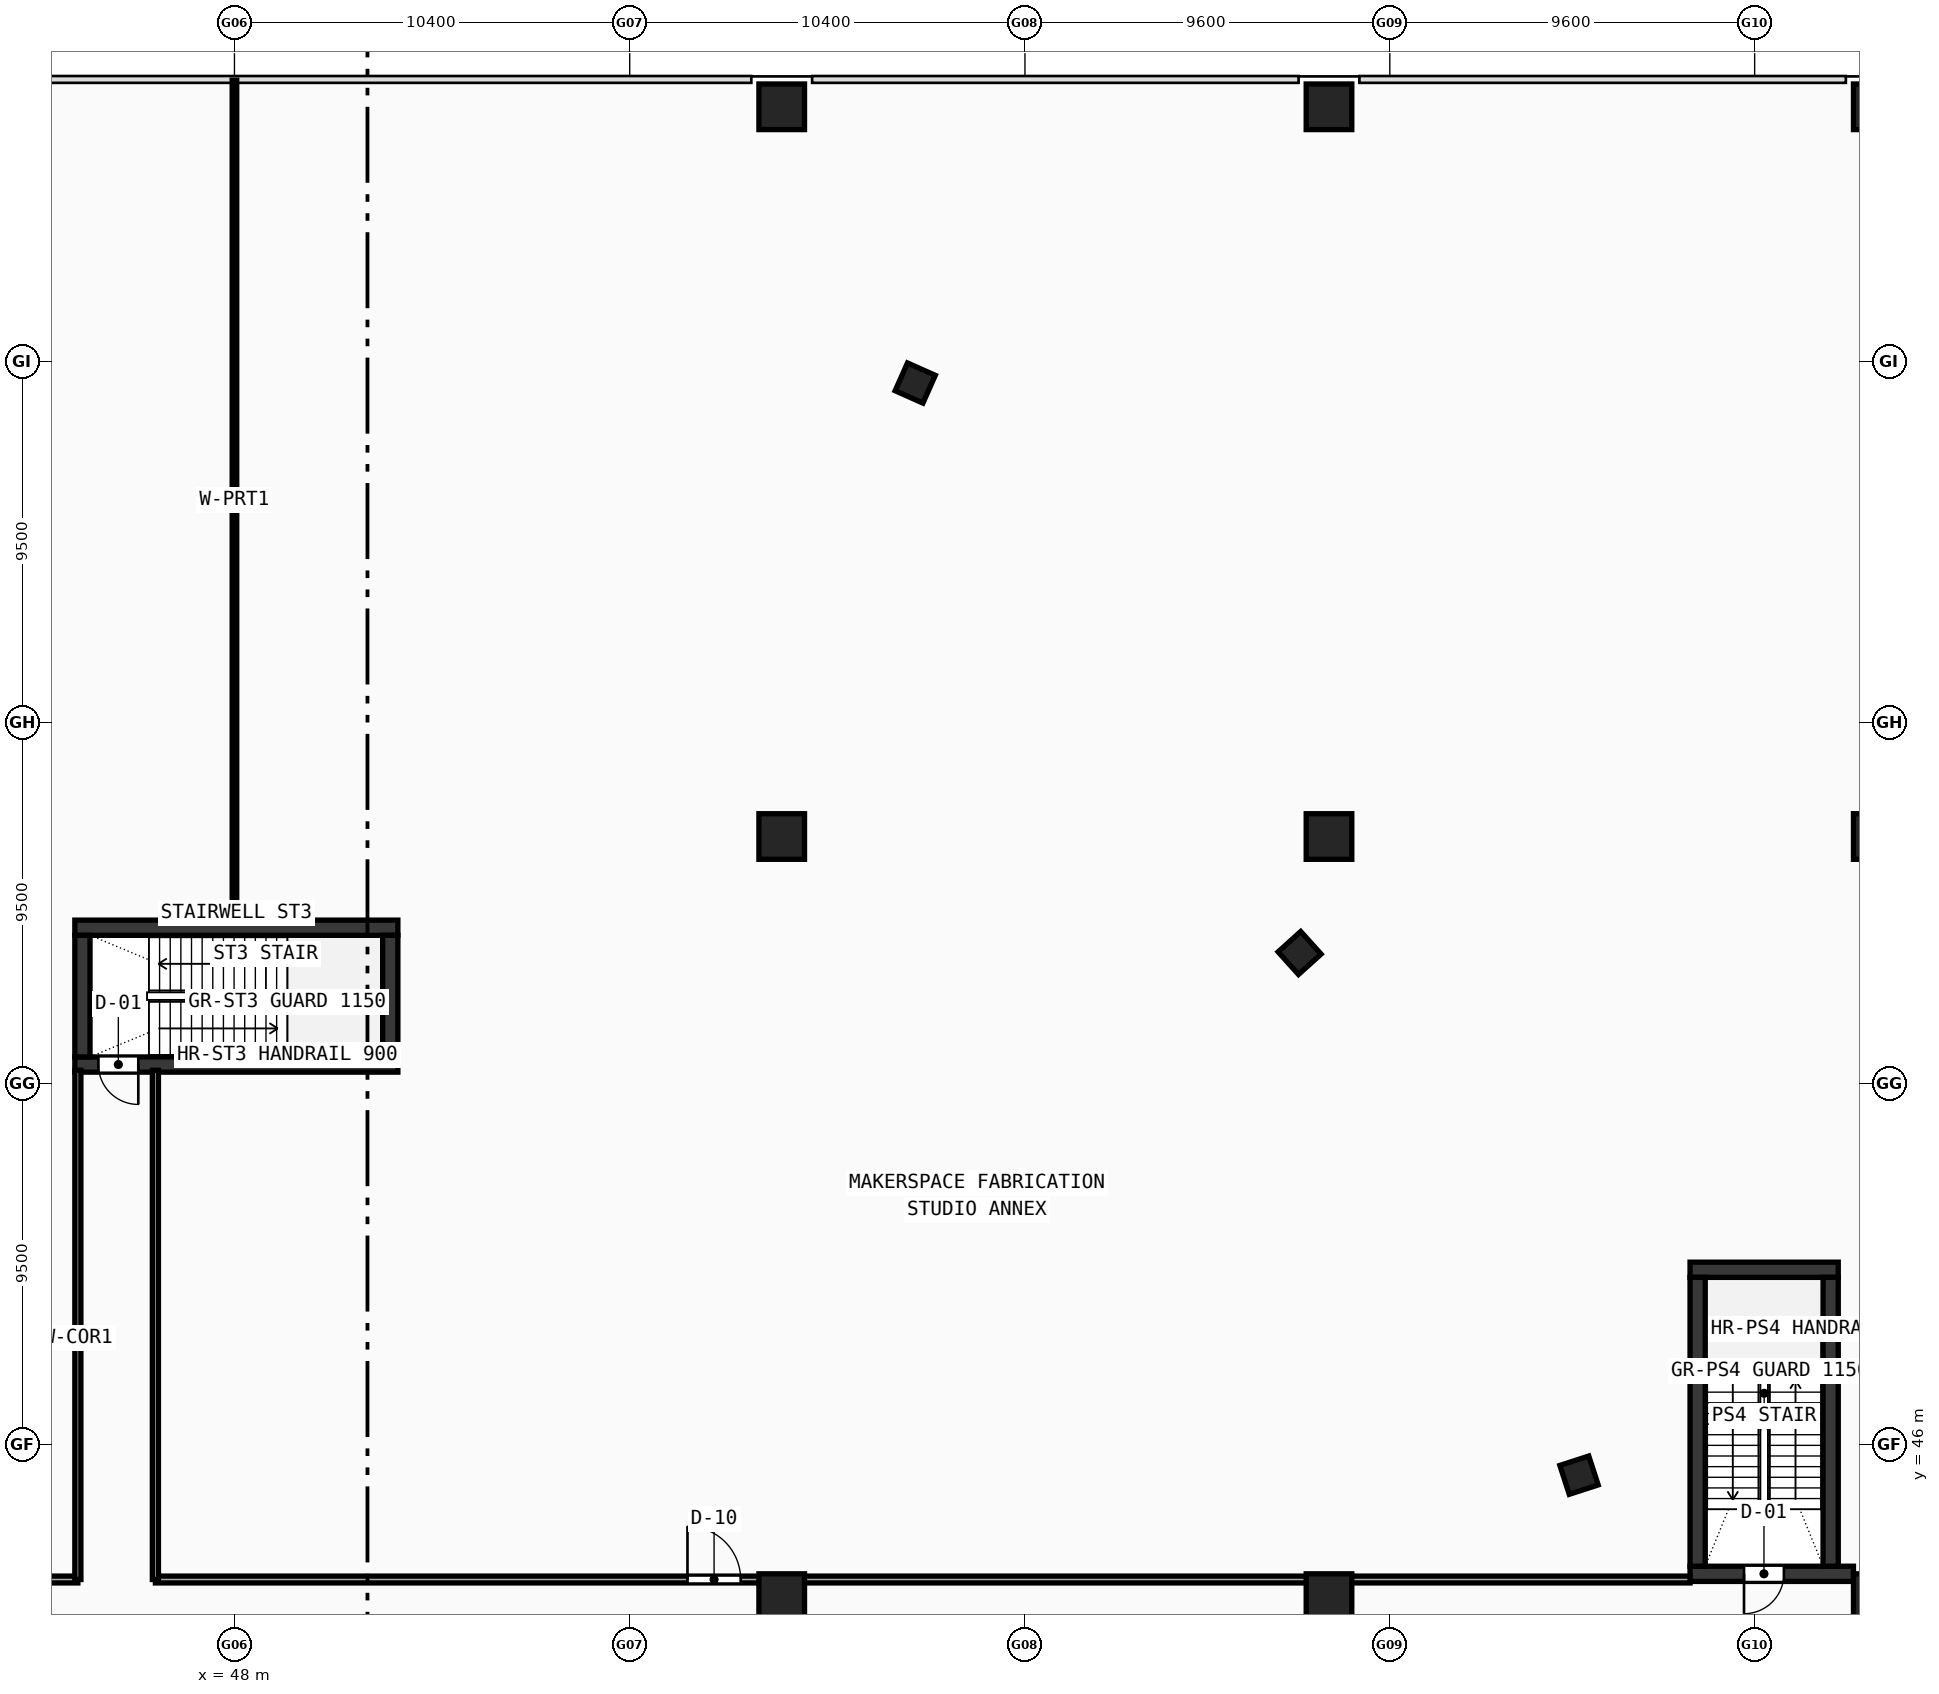
"""IFC4 building model, lengths in metres.
Left out: names, types, materials, properties, quantities, classifications, styles, units other than length and angle.
Written with IfcOpenShell. Run it as: python <this file> out.ifc"""

import sys

from ifc_helpers import new_model, si_unit, direction, frame, frame_2d, origin, origin_with_axes, origin_2d, place, context, subcontext, project, spatial, rectangle, hollow_rectangle, extrude, source, transform, mapped, element, fill, save


model = new_model("IFC4")
c1 = context("Model", 3, precision=1e-05, world=origin(), true_north=direction((0.0, 1.0)))
c2 = subcontext(c1, "Body", "Model", "MODEL_VIEW")
j1 = project(units=[si_unit("LENGTHUNIT", "METRE"), si_unit("PLANEANGLEUNIT", "RADIAN")], contexts=[c1])
p1 = place(None, origin())
s1 = spatial("IfcSite", under=j1, at=p1, CompositionType="ELEMENT")
p2 = place(p1, origin())
s2 = spatial("IfcBuilding", under=s1, at=p2, CompositionType="ELEMENT")
p3 = place(p2, frame((0.0, 0.0, 14.4)))
s3 = spatial("IfcBuildingStorey", under=s2, at=p3, CompositionType="ELEMENT", Elevation=14.4)
p4 = place(p3, frame((86.3, 50.6, 0.0), z_axis=(0.0, 0.0, 1.0), x_axis=(1.0, 0.0, 0.0)))
e1 = element("IfcWall", 1, at=p4, inside=s3, PredefinedType="SHEAR", context=c2, shape_type="SweptSolid", body=[
    extrude(rectangle(XDim=3.9, YDim=0.4, at=frame_2d((1.95, 0.0))), origin(), (0.0, 0.0, 1.0), 4.52),
])
p5 = place(p3, frame((86.3, 42.6, 0.0), z_axis=(0.0, 0.0, 1.0), x_axis=(1.0, 0.0, 0.0)))
e2 = element("IfcWall", 2, at=p5, inside=s3, PredefinedType="SHEAR", context=c2, shape_type="SweptSolid", body=[
    extrude(rectangle(XDim=4.3, YDim=0.4, at=frame_2d((2.15, 0.0))), origin(), (0.0, 0.0, 1.0), 4.52),
])
p6 = place(p5, frame((1.42, 0.0, 0.0)))
e3 = element("IfcOpeningElement", 3, at=p6, cuts=e2, PredefinedType="OPENING", context=c2, shape_type="SweptSolid", body=[
    extrude(rectangle(XDim=1.05, YDim=2.1, at=frame_2d((0.525, 1.05))), frame((0.0, 0.21, 0.0), z_axis=(0.0, -1.0, 0.0), x_axis=(1.0, 0.0, 0.0)), (0.0, 0.0, 1.0), 0.42),
])
for number, where, z_axis, x_axis in (
    (4, (86.5, 42.8, 0.0), (0.0, 0.0, 1.0), (0.0, 1.0, 0.0)),
    (5, (90.0, 42.8, 0.0), (0.0, 0.0, 1.0), (0.0, 1.0, 0.0)),
):
    element("IfcWall", number, at=place(p3, frame(where, z_axis=z_axis, x_axis=x_axis)), inside=s3, PredefinedType="SHEAR", context=c2, shape_type="SweptSolid", body=[
        extrude(rectangle(XDim=7.6, YDim=0.4, at=frame_2d((3.8, 0.0))), origin(), (0.0, 0.0, 1.0), 4.52),
    ])
p7 = place(p3, frame((43.8, 59.6, 0.0), z_axis=(0.0, 0.0, 1.0), x_axis=(1.0, 0.0, 0.0)))
e6 = element("IfcWall", 6, at=p7, inside=s3, PredefinedType="SHEAR", context=c2, shape_type="SweptSolid", body=[
    extrude(rectangle(XDim=8.5, YDim=0.4, at=frame_2d((4.25, 0.0))), origin(), (0.0, 0.0, 1.0), 4.52),
])
p8 = place(p3, frame((43.8, 56.0, 0.0), z_axis=(0.0, 0.0, 1.0), x_axis=(1.0, 0.0, 0.0)))
e7 = element("IfcWall", 7, at=p8, inside=s3, PredefinedType="SHEAR", context=c2, shape_type="SweptSolid", body=[
    extrude(rectangle(XDim=8.5, YDim=0.4, at=frame_2d((4.25, 0.0))), origin(), (0.0, 0.0, 1.0), 4.52),
])
p9 = place(p8, frame((0.62, 0.0, 0.0)))
e8 = element("IfcOpeningElement", 8, at=p9, cuts=e7, PredefinedType="OPENING", context=c2, shape_type="SweptSolid", body=[
    extrude(rectangle(XDim=1.05, YDim=2.1, at=frame_2d((0.525, 1.05))), frame((0.0, 0.21, 0.0), z_axis=(0.0, -1.0, 0.0), x_axis=(1.0, 0.0, 0.0)), (0.0, 0.0, 1.0), 0.42),
])
for number, where, z_axis, x_axis in (
    (9, (44.0, 56.2, 0.0), (0.0, 0.0, 1.0), (0.0, 1.0, 0.0)),
    (10, (52.1, 56.2, 0.0), (0.0, 0.0, 1.0), (0.0, 1.0, 0.0)),
):
    element("IfcWall", number, at=place(p3, frame(where, z_axis=z_axis, x_axis=x_axis)), inside=s3, PredefinedType="SHEAR", context=c2, shape_type="SweptSolid", body=[
        extrude(rectangle(XDim=3.2, YDim=0.4, at=frame_2d((1.6, 0.0))), origin(), (0.0, 0.0, 1.0), 4.52),
    ])
m1 = source(origin(), c2, "Body", "SweptSolid", [
    extrude(hollow_rectangle(XDim=1.2, YDim=1.2, WallThickness=0.05, at=origin_2d()), origin(), (0.0, 0.0, 1.0), 4.8),
])
for number, where, z_axis, x_axis in (
    (11, (62.4, 42.0, -0.28), (0.0, 0.0, 1.0), (1.0, 0.0, 0.0)),
    (12, (62.4, 62.0, -0.28), (0.0, 0.0, 1.0), (1.0, 0.0, 0.0)),
    (13, (62.4, 81.2, -0.28), (0.0, 0.0, 1.0), (1.0, 0.0, 0.0)),
    (14, (76.8, 42.0, -0.28), (0.0, 0.0, 1.0), (1.0, 0.0, 0.0)),
    (15, (76.8, 62.0, -0.28), (0.0, 0.0, 1.0), (1.0, 0.0, 0.0)),
    (16, (76.8, 81.2, -0.28), (0.0, 0.0, 1.0), (1.0, 0.0, 0.0)),
    (17, (91.2, 42.0, -0.28), (0.0, 0.0, 1.0), (1.0, 0.0, 0.0)),
    (18, (91.2, 62.0, -0.28), (0.0, 0.0, 1.0), (1.0, 0.0, 0.0)),
    (19, (91.2, 81.2, -0.28), (0.0, 0.0, 1.0), (1.0, 0.0, 0.0)),
):
    element("IfcColumn", number, at=place(p3, frame(where, z_axis=z_axis, x_axis=x_axis)), inside=s3, PredefinedType="COLUMN", context=c2, shape_type="MappedRepresentation", body=[
        mapped(m1, transform((0.0, 0.0, 0.0), scale=1.0)),
    ])
m2 = source(origin(), c2, "Body", "SweptSolid", [
    extrude(hollow_rectangle(XDim=0.8, YDim=0.8, WallThickness=0.032, at=origin_2d()), origin(), (0.0, 0.0, 1.0), 4.8),
])
for number, where, z_axis, x_axis in (
    (20, (83.379, 45.196, -0.28), (0.0, 0.0, 1.0), (-0.309, 0.951, 0.0)),
    (21, (76.027, 58.935, -0.28), (0.0, 0.0, 1.0), (-0.669, 0.743, 0.0)),
    (22, (65.913, 73.932, -0.28), (0.0, 0.0, 1.0), (-0.914, 0.407, 0.0)),
):
    element("IfcColumn", number, at=place(p3, frame(where, z_axis=z_axis, x_axis=x_axis)), inside=s3, PredefinedType="COLUMN", context=c2, shape_type="MappedRepresentation", body=[
        mapped(m2, transform((0.0, 0.0, 0.0), scale=1.0)),
    ])
p10 = place(p3, frame((9.7, 42.45, 0.0), z_axis=(0.0, 0.0, 1.0), x_axis=(1.0, 0.0, 0.0)))
e23 = element("IfcWall", 23, at=p10, inside=s3, PredefinedType="PARTITIONING", context=c2, shape_type="SweptSolid", body=[
    extrude(rectangle(XDim=34.18, YDim=0.18, at=frame_2d((17.09, 0.0))), origin(), (0.0, 0.0, 1.0), 3.62),
])
p11 = place(p10, frame((16.39, 0.0, 0.0)))
e24 = element("IfcOpeningElement", 24, at=p11, cuts=e23, PredefinedType="OPENING", context=c2, shape_type="SweptSolid", body=[
    extrude(rectangle(XDim=1.4, YDim=2.15, at=frame_2d((0.7, 1.075))), frame((0.0, 0.1, 0.0), z_axis=(0.0, -1.0, 0.0), x_axis=(1.0, 0.0, 0.0)), (0.0, 0.0, 1.0), 0.2),
])
p12 = place(p3, frame((45.92, 42.45, 0.0), z_axis=(0.0, 0.0, 1.0), x_axis=(1.0, 0.0, 0.0)))
e25 = element("IfcWall", 25, at=p12, inside=s3, PredefinedType="PARTITIONING", context=c2, shape_type="SweptSolid", body=[
    extrude(rectangle(XDim=40.38, YDim=0.18, at=frame_2d((20.19, 0.0))), origin(), (0.0, 0.0, 1.0), 3.62),
])
p13 = place(p12, frame((14.0, 0.0, 0.0)))
e26 = element("IfcOpeningElement", 26, at=p13, cuts=e25, PredefinedType="OPENING", context=c2, shape_type="SweptSolid", body=[
    extrude(rectangle(XDim=1.4, YDim=2.15, at=frame_2d((0.7, 1.075))), frame((0.0, 0.1, 0.0), z_axis=(0.0, -1.0, 0.0), x_axis=(1.0, 0.0, 0.0)), (0.0, 0.0, 1.0), 0.2),
])
for number, where, z_axis, x_axis in (
    (27, (43.88, 42.45, 0.0), (0.0, 0.0, 1.0), (0.0, 1.0, 0.0)),
    (28, (45.92, 42.45, 0.0), (0.0, 0.0, 1.0), (0.0, 1.0, 0.0)),
):
    element("IfcWall", number, at=place(p3, frame(where, z_axis=z_axis, x_axis=x_axis)), inside=s3, PredefinedType="PARTITIONING", context=c2, shape_type="SweptSolid", body=[
        extrude(rectangle(XDim=13.4, YDim=0.16, at=frame_2d((6.7, 0.0))), origin(), (0.0, 0.0, 1.0), 4.12),
    ])
p14 = place(p3, frame((48.0, 59.8, 0.0), z_axis=(0.0, 0.0, 1.0), x_axis=(0.0, 1.0, 0.0)))
e29 = element("IfcWall", 29, at=p14, inside=s3, PredefinedType="PARTITIONING", context=c2, shape_type="SweptSolid", body=[
    extrude(rectangle(XDim=22.1, YDim=0.12, at=frame_2d((11.05, 0.0))), origin(), (0.0, 0.0, 1.0), 3.62),
])
m3 = source(origin(), c2, "Body", "SweptSolid", [
    extrude(rectangle(XDim=1.05, YDim=2.1, at=frame_2d((0.525, 1.05))), frame((0.0, 0.025, 0.0), z_axis=(0.0, -1.0, 0.0), x_axis=(1.0, 0.0, 0.0)), (0.0, 0.0, 1.0), 0.05),
])
p15 = place(p6, frame((1.05, 0.0, 0.0), z_axis=(0.0, 0.0, 1.0), x_axis=(-1.0, 0.0, 0.0)))
e30 = element("IfcDoor", 30, at=p15, inside=s3, OperationType="SINGLE_SWING_RIGHT", PredefinedType="DOOR", context=c2, shape_type="MappedRepresentation", body=[
    mapped(m3, transform((0.0, 0.0, 0.0), scale=1.0)),
])
fill(e3, e30)
p16 = place(p9, frame((1.05, 0.0, 0.0), z_axis=(0.0, 0.0, 1.0), x_axis=(-1.0, 0.0, 0.0)))
e31 = element("IfcDoor", 31, at=p16, inside=s3, OperationType="SINGLE_SWING_LEFT", PredefinedType="DOOR", context=c2, shape_type="MappedRepresentation", body=[
    mapped(m3, transform((0.0, 0.0, 0.0), scale=1.0)),
])
fill(e8, e31)
m4 = source(origin(), c2, "Body", "SweptSolid", [
    extrude(rectangle(XDim=1.4, YDim=2.15, at=frame_2d((0.7, 1.075))), frame((0.0, 0.025, 0.0), z_axis=(0.0, -1.0, 0.0), x_axis=(1.0, 0.0, 0.0)), (0.0, 0.0, 1.0), 0.05),
])
p17 = place(p13, origin_with_axes())
e32 = element("IfcDoor", 32, at=p17, inside=s3, OperationType="SINGLE_SWING_LEFT", PredefinedType="DOOR", context=c2, shape_type="MappedRepresentation", body=[
    mapped(m4, transform((0.0, 0.0, 0.0), scale=1.0)),
])
fill(e26, e32)
save(model, sys.argv[1])
